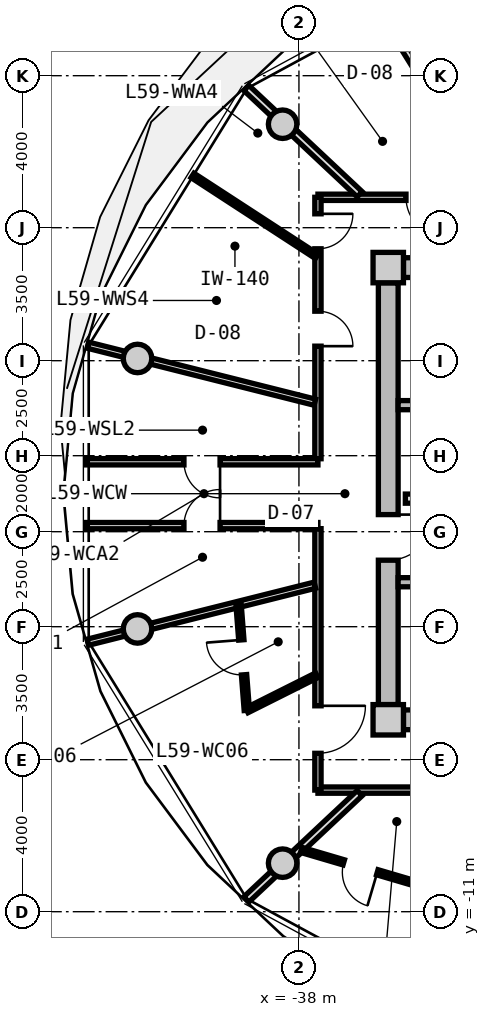
"""IFC4 building model, lengths in metres.
Left out: names, types, materials, properties, quantities, classifications, styles, units other than length and angle.
Written with IfcOpenShell. Run it as: python <this file> out.ifc"""

import sys

from ifc_helpers import new_model, si_unit, direction, frame, frame_2d, origin, origin_2d, place, context, subcontext, project, spatial, rectangle, circle, extrude, source, transform, mapped, element, fill, save


model = new_model("IFC4")
c1 = context("Model", 3, precision=1e-05, world=origin(), true_north=direction((0.0, 1.0)))
c2 = subcontext(c1, "Body", "Model", "MODEL_VIEW")
j1 = project(units=[si_unit("LENGTHUNIT", "METRE"), si_unit("PLANEANGLEUNIT", "RADIAN")], contexts=[c1])
p1 = place(None, origin())
s1 = spatial("IfcSite", under=j1, at=p1, CompositionType="ELEMENT")
p2 = place(p1, origin())
s2 = spatial("IfcBuilding", under=s1, at=p2, CompositionType="ELEMENT")
p3 = place(p2, frame((0.0, 0.0, 190.65)))
s3 = spatial("IfcBuildingStorey", under=s2, at=p3, CompositionType="ELEMENT", Elevation=190.65)
m1 = source(origin(), c2, "Body", "SweptSolid", [
    extrude(rectangle(XDim=0.8, YDim=0.8, at=origin_2d()), origin(), (0.0, 0.0, 1.0), 3.05),
])
for number, where, z_axis, x_axis in (
    (1, (-35.65, -5.95, 0.0), (0.0, 0.0, 1.0), (1.0, 0.0, 0.0)),
    (2, (-35.65, 5.95, 0.0), (0.0, 0.0, 1.0), (1.0, 0.0, 0.0)),
):
    element("IfcColumn", number, at=place(p3, frame(where, z_axis=z_axis, x_axis=x_axis)), inside=s3, PredefinedType="COLUMN", context=c2, shape_type="MappedRepresentation", body=[
        mapped(m1, transform((0.0, 0.0, 0.0), x_axis=(1.0, 0.0, 0.0), y_axis=(0.0, 1.0, 0.0), z_axis=(0.0, 0.0, 1.0), scale=1.0)),
    ])
m2 = source(origin(), c2, "Body", "SweptSolid", [
    extrude(rectangle(XDim=14.5, YDim=0.52, at=frame_2d((7.25, 0.0))), origin(), (0.0, 0.0, 1.0), 2.81),
])
for number, where, z_axis, x_axis in (
    (3, (-35.25, 5.95, 0.0), (0.0, 0.0, 1.0), (1.0, 0.0, 0.0)),
    (4, (-20.75, -5.95, 0.0), (0.0, 0.0, 1.0), (-1.0, 0.0, 0.0)),
):
    element("IfcWall", number, at=place(p3, frame(where, z_axis=z_axis, x_axis=x_axis)), inside=s3, PredefinedType="SHEAR", context=c2, shape_type="MappedRepresentation", body=[
        mapped(m2, transform((0.0, 0.0, 0.0), x_axis=(1.0, 0.0, 0.0), y_axis=(0.0, 1.0, 0.0), z_axis=(0.0, 0.0, 1.0), scale=1.0)),
    ])
m3 = source(origin(), c2, "Body", "SweptSolid", [
    extrude(rectangle(XDim=11.1, YDim=0.52, at=frame_2d((5.55, 0.0))), origin(), (0.0, 0.0, 1.0), 2.81),
])
p4 = place(p3, frame((-35.65, -5.55, 0.0), z_axis=(0.0, 0.0, 1.0), x_axis=(0.0, 1.0, 0.0)))
e5 = element("IfcWall", 5, at=p4, inside=s3, PredefinedType="SHEAR", context=c2, shape_type="MappedRepresentation", body=[
    mapped(m3, transform((0.0, 0.0, 0.0), x_axis=(1.0, 0.0, 0.0), y_axis=(0.0, 1.0, 0.0), z_axis=(0.0, 0.0, 1.0), scale=1.0)),
])
p5 = place(p4, frame((3.8, 0.0, 0.0)))
e6 = element("IfcOpeningElement", 6, at=p5, cuts=e5, PredefinedType="OPENING", context=c2, shape_type="SweptSolid", body=[
    extrude(rectangle(XDim=1.2, YDim=2.15, at=frame_2d((0.6, 1.075))), frame((0.0, 0.27, 0.0), z_axis=(0.0, -1.0, 0.0), x_axis=(1.0, 0.0, 0.0)), (0.0, 0.0, 1.0), 0.54),
])
m4 = source(origin(), c2, "Body", "SweptSolid", [
    extrude(circle(Radius=0.375, at=origin_2d()), origin(), (0.0, 0.0, 1.0), 3.47),
])
for number, where, z_axis, x_axis in (
    (7, (-38.43, 9.723, -0.42), (0.0, 0.0, 1.0), (1.0, 0.0, 0.0)),
    (8, (-42.247, 3.559, -0.42), (0.0, 0.0, 1.0), (1.0, 0.0, 0.0)),
    (9, (-42.247, -3.559, -0.42), (0.0, 0.0, 1.0), (1.0, 0.0, 0.0)),
    (10, (-38.43, -9.723, -0.42), (0.0, 0.0, 1.0), (1.0, 0.0, 0.0)),
):
    element("IfcColumn", number, at=place(p3, frame(where, z_axis=z_axis, x_axis=x_axis)), inside=s3, PredefinedType="COLUMN", context=c2, shape_type="MappedRepresentation", body=[
        mapped(m4, transform((0.0, 0.0, 0.0), x_axis=(1.0, 0.0, 0.0), y_axis=(0.0, 1.0, 0.0), z_axis=(0.0, 0.0, 1.0), scale=1.0)),
    ])
m5 = source(origin(), c2, "Body", "SweptSolid", [
    extrude(rectangle(XDim=7.93, YDim=0.24, at=frame_2d((3.965, 0.0))), origin(), (0.0, 0.0, 1.0), 2.81),
])
p6 = place(p3, frame((-35.39, 2.33, 0.0), z_axis=(0.0, 0.0, 1.0), x_axis=(1.0, 0.0, 0.0)))
e11 = element("IfcWall", 11, at=p6, inside=s3, PredefinedType="PARTITIONING", context=c2, shape_type="MappedRepresentation", body=[
    mapped(m5, transform((0.0, 0.0, 0.0), x_axis=(1.0, 0.0, 0.0), y_axis=(0.0, 1.0, 0.0), z_axis=(0.0, 0.0, 1.0), scale=1.0)),
])
p7 = place(p3, frame((-35.39, -2.33, 0.0), z_axis=(0.0, 0.0, 1.0), x_axis=(1.0, 0.0, 0.0)))
e12 = element("IfcWall", 12, at=p7, inside=s3, PredefinedType="PARTITIONING", context=c2, shape_type="MappedRepresentation", body=[
    mapped(m5, transform((0.0, 0.0, 0.0), x_axis=(1.0, 0.0, 0.0), y_axis=(0.0, 1.0, 0.0), z_axis=(0.0, 0.0, 1.0), scale=1.0)),
])
p8 = place(p7, frame((1.05, 0.0, 0.0)))
e13 = element("IfcOpeningElement", 13, at=p8, cuts=e12, PredefinedType="OPENING", context=c2, shape_type="SweptSolid", body=[
    extrude(rectangle(XDim=1.1, YDim=2.15, at=frame_2d((0.55, 1.075))), frame((0.0, 0.13, 0.0), z_axis=(0.0, -1.0, 0.0), x_axis=(1.0, 0.0, 0.0)), (0.0, 0.0, 1.0), 0.26),
])
m6 = source(origin(), c2, "Body", "SweptSolid", [
    extrude(rectangle(XDim=7.62, YDim=0.24, at=frame_2d((3.81, 0.0))), origin(), (0.0, 0.0, 1.0), 2.795),
])
p9 = place(p3, frame((-35.2, -0.13, 0.0), z_axis=(0.0, 0.0, 1.0), x_axis=(1.0, 0.0, 0.0)))
e14 = element("IfcWall", 14, at=p9, inside=s3, PredefinedType="PARTITIONING", context=c2, shape_type="MappedRepresentation", body=[
    mapped(m6, transform((0.0, 0.0, 0.0), x_axis=(1.0, 0.0, 0.0), y_axis=(0.0, 1.0, 0.0), z_axis=(0.0, 0.0, 1.0), scale=1.0)),
])
p10 = place(p9, frame((6.22, 0.0, 0.0)))
e15 = element("IfcOpeningElement", 15, at=p10, cuts=e14, PredefinedType="OPENING", context=c2, shape_type="SweptSolid", body=[
    extrude(rectangle(XDim=1.0, YDim=2.1, at=frame_2d((0.5, 1.05))), frame((0.0, 0.13, 0.0), z_axis=(0.0, -1.0, 0.0), x_axis=(1.0, 0.0, 0.0)), (0.0, 0.0, 1.0), 0.26),
])
p11 = place(p9, frame((2.4, 0.0, 0.0)))
e16 = element("IfcOpeningElement", 16, at=p11, cuts=e14, PredefinedType="OPENING", context=c2, shape_type="SweptSolid", body=[
    extrude(rectangle(XDim=1.0, YDim=2.1, at=frame_2d((0.5, 1.05))), frame((0.0, 0.13, 0.0), z_axis=(0.0, -1.0, 0.0), x_axis=(1.0, 0.0, 0.0)), (0.0, 0.0, 1.0), 0.26),
])
m7 = source(origin(), c2, "Body", "SweptSolid", [
    extrude(rectangle(XDim=8.58, YDim=0.165, at=frame_2d((4.29, 0.0))), origin(), (0.0, 0.0, 1.0), 2.795),
])
p12 = place(p3, frame((-37.5, 7.8, 0.0), z_axis=(0.0, 0.0, 1.0), x_axis=(1.0, 0.0, 0.0)))
e17 = element("IfcWall", 17, at=p12, inside=s3, PredefinedType="PARTITIONING", context=c2, shape_type="MappedRepresentation", body=[
    mapped(m7, transform((0.0, 0.0, 0.0), x_axis=(1.0, 0.0, 0.0), y_axis=(0.0, 1.0, 0.0), z_axis=(0.0, 0.0, 1.0), scale=1.0)),
])
p13 = place(p12, frame((5.408, 0.0, 0.0)))
e18 = element("IfcOpeningElement", 18, at=p13, cuts=e17, PredefinedType="OPENING", context=c2, shape_type="SweptSolid", body=[
    extrude(rectangle(XDim=1.05, YDim=2.15, at=frame_2d((0.525, 1.075))), frame((0.0, 0.093, 0.0), z_axis=(0.0, -1.0, 0.0), x_axis=(1.0, 0.0, 0.0)), (0.0, 0.0, 1.0), 0.185),
])
p14 = place(p12, frame((2.317, 0.0, 0.0)))
e19 = element("IfcOpeningElement", 19, at=p14, cuts=e17, PredefinedType="OPENING", context=c2, shape_type="SweptSolid", body=[
    extrude(rectangle(XDim=1.05, YDim=2.15, at=frame_2d((0.525, 1.075))), frame((0.0, 0.093, 0.0), z_axis=(0.0, -1.0, 0.0), x_axis=(1.0, 0.0, 0.0)), (0.0, 0.0, 1.0), 0.185),
])
m8 = source(origin(), c2, "Body", "SweptSolid", [
    extrude(rectangle(XDim=19.0, YDim=0.165, at=frame_2d((9.5, 0.0))), origin(), (0.0, 0.0, 1.0), 2.795),
])
p15 = place(p3, frame((-18.5, -7.8, 0.0), z_axis=(0.0, 0.0, 1.0), x_axis=(-1.0, 0.0, 0.0)))
e20 = element("IfcWall", 20, at=p15, inside=s3, PredefinedType="PARTITIONING", context=c2, shape_type="MappedRepresentation", body=[
    mapped(m8, transform((0.0, 0.0, 0.0), x_axis=(1.0, 0.0, 0.0), y_axis=(0.0, 1.0, 0.0), z_axis=(0.0, 0.0, 1.0), scale=1.0)),
])
p16 = place(p15, frame((12.569, 0.0, 0.0)))
e21 = element("IfcOpeningElement", 21, at=p16, cuts=e20, PredefinedType="OPENING", context=c2, shape_type="SweptSolid", body=[
    extrude(rectangle(XDim=1.25, YDim=2.2, at=frame_2d((0.625, 1.1))), frame((0.0, 0.093, 0.0), z_axis=(0.0, -1.0, 0.0), x_axis=(1.0, 0.0, 0.0)), (0.0, 0.0, 1.0), 0.185),
])
p17 = place(p15, frame((7.868, 0.0, 0.0)))
e22 = element("IfcOpeningElement", 22, at=p17, cuts=e20, PredefinedType="OPENING", context=c2, shape_type="SweptSolid", body=[
    extrude(rectangle(XDim=1.25, YDim=2.2, at=frame_2d((0.625, 1.1))), frame((0.0, 0.093, 0.0), z_axis=(0.0, -1.0, 0.0), x_axis=(1.0, 0.0, 0.0)), (0.0, 0.0, 1.0), 0.185),
])
p18 = place(p15, frame((3.559, 0.0, 0.0)))
e23 = element("IfcOpeningElement", 23, at=p18, cuts=e20, PredefinedType="OPENING", context=c2, shape_type="SweptSolid", body=[
    extrude(rectangle(XDim=1.25, YDim=2.2, at=frame_2d((0.625, 1.1))), frame((0.0, 0.093, 0.0), z_axis=(0.0, -1.0, 0.0), x_axis=(1.0, 0.0, 0.0)), (0.0, 0.0, 1.0), 0.185),
])
m9 = source(origin(), c2, "Body", "SweptSolid", [
    extrude(rectangle(XDim=6.88, YDim=0.165, at=frame_2d((3.44, 0.0))), origin(), (0.0, 0.0, 1.0), 2.795),
])
p19 = place(p3, frame((-37.5, -7.8, 0.0), z_axis=(0.0, 0.0, 1.0), x_axis=(0.0, 1.0, 0.0)))
e24 = element("IfcWall", 24, at=p19, inside=s3, PredefinedType="PARTITIONING", context=c2, shape_type="MappedRepresentation", body=[
    mapped(m9, transform((0.0, 0.0, 0.0), x_axis=(1.0, 0.0, 0.0), y_axis=(0.0, 1.0, 0.0), z_axis=(0.0, 0.0, 1.0), scale=1.0)),
])
p20 = place(p19, frame((0.968, 0.0, 0.0)))
e25 = element("IfcOpeningElement", 25, at=p20, cuts=e24, PredefinedType="OPENING", context=c2, shape_type="SweptSolid", body=[
    extrude(rectangle(XDim=1.25, YDim=2.2, at=frame_2d((0.625, 1.1))), frame((0.0, 0.093, 0.0), z_axis=(0.0, -1.0, 0.0), x_axis=(1.0, 0.0, 0.0)), (0.0, 0.0, 1.0), 0.185),
])
p21 = place(p3, frame((-37.5, 0.92, 0.0), z_axis=(0.0, 0.0, 1.0), x_axis=(0.0, 1.0, 0.0)))
e26 = element("IfcWall", 26, at=p21, inside=s3, PredefinedType="PARTITIONING", context=c2, shape_type="MappedRepresentation", body=[
    mapped(m9, transform((0.0, 0.0, 0.0), x_axis=(1.0, 0.0, 0.0), y_axis=(0.0, 1.0, 0.0), z_axis=(0.0, 0.0, 1.0), scale=1.0)),
])
p22 = place(p21, frame((5.525, 0.0, 0.0)))
e27 = element("IfcOpeningElement", 27, at=p22, cuts=e26, PredefinedType="OPENING", context=c2, shape_type="SweptSolid", body=[
    extrude(rectangle(XDim=0.92, YDim=2.1, at=frame_2d((0.46, 1.05))), frame((0.0, 0.093, 0.0), z_axis=(0.0, -1.0, 0.0), x_axis=(1.0, 0.0, 0.0)), (0.0, 0.0, 1.0), 0.185),
])
p23 = place(p21, frame((2.962, 0.0, 0.0)))
e28 = element("IfcOpeningElement", 28, at=p23, cuts=e26, PredefinedType="OPENING", context=c2, shape_type="SweptSolid", body=[
    extrude(rectangle(XDim=0.92, YDim=2.1, at=frame_2d((0.46, 1.05))), frame((0.0, 0.093, 0.0), z_axis=(0.0, -1.0, 0.0), x_axis=(1.0, 0.0, 0.0)), (0.0, 0.0, 1.0), 0.185),
])
m10 = source(origin(), c2, "Body", "SweptSolid", [
    extrude(rectangle(XDim=6.157, YDim=0.165, at=frame_2d((3.079, 0.0))), origin(), (0.0, 0.0, 1.0), 2.395),
])
for number, where, z_axis, x_axis in (
    (29, (-37.58, 2.407, 0.0), (0.0, 0.0, 1.0), (-0.97, 0.244, 0.0)),
    (30, (-37.58, -2.407, 0.0), (0.0, 0.0, 1.0), (-0.97, -0.244, 0.0)),
):
    element("IfcWall", number, at=place(p3, frame(where, z_axis=z_axis, x_axis=x_axis)), inside=s3, PredefinedType="PARTITIONING", context=c2, shape_type="MappedRepresentation", body=[
        mapped(m10, transform((0.0, 0.0, 0.0), x_axis=(1.0, 0.0, 0.0), y_axis=(0.0, 1.0, 0.0), z_axis=(0.0, 0.0, 1.0), scale=1.0)),
    ])
m11 = source(origin(), c2, "Body", "SweptSolid", [
    extrude(rectangle(XDim=6.101, YDim=0.165, at=frame_2d((3.051, 0.0))), origin(), (0.0, 0.0, 1.0), 2.795),
])
p24 = place(p3, frame((-43.601, 0.84, 0.0), z_axis=(0.0, 0.0, 1.0), x_axis=(1.0, 0.0, 0.0)))
e31 = element("IfcWall", 31, at=p24, inside=s3, PredefinedType="PARTITIONING", context=c2, shape_type="MappedRepresentation", body=[
    mapped(m11, transform((0.0, 0.0, 0.0), x_axis=(1.0, 0.0, 0.0), y_axis=(0.0, 1.0, 0.0), z_axis=(0.0, 0.0, 1.0), scale=1.0)),
])
p25 = place(p24, frame((2.576, 0.0, 0.0)))
e32 = element("IfcOpeningElement", 32, at=p25, cuts=e31, PredefinedType="OPENING", context=c2, shape_type="SweptSolid", body=[
    extrude(rectangle(XDim=0.95, YDim=2.1, at=frame_2d((0.475, 1.05))), frame((0.0, 0.093, 0.0), z_axis=(0.0, -1.0, 0.0), x_axis=(1.0, 0.0, 0.0)), (0.0, 0.0, 1.0), 0.185),
])
p26 = place(p3, frame((-37.5, -0.84, 0.0), z_axis=(0.0, 0.0, 1.0), x_axis=(-1.0, 0.0, 0.0)))
e33 = element("IfcWall", 33, at=p26, inside=s3, PredefinedType="PARTITIONING", context=c2, shape_type="MappedRepresentation", body=[
    mapped(m11, transform((0.0, 0.0, 0.0), x_axis=(1.0, 0.0, 0.0), y_axis=(0.0, 1.0, 0.0), z_axis=(0.0, 0.0, 1.0), scale=1.0)),
])
p27 = place(p26, frame((2.576, 0.0, 0.0)))
e34 = element("IfcOpeningElement", 34, at=p27, cuts=e33, PredefinedType="OPENING", context=c2, shape_type="SweptSolid", body=[
    extrude(rectangle(XDim=0.95, YDim=2.1, at=frame_2d((0.475, 1.05))), frame((0.0, 0.093, 0.0), z_axis=(0.0, -1.0, 0.0), x_axis=(1.0, 0.0, 0.0)), (0.0, 0.0, 1.0), 0.185),
])
m12 = source(origin(), c2, "Body", "SweptSolid", [
    extrude(rectangle(XDim=4.089, YDim=0.19, at=frame_2d((2.044, 0.0))), origin(), (0.0, 0.0, 1.0), 2.395),
])
p28 = place(p3, frame((-36.402, 7.88, 0.0), z_axis=(0.0, 0.0, 1.0), x_axis=(-0.729401273609, 0.684086092577, 0.0)))
e35 = element("IfcWall", 35, at=p28, inside=s3, PredefinedType="PARTITIONING", context=c2, shape_type="MappedRepresentation", body=[
    mapped(m12, transform((0.0, 0.0, 0.0), x_axis=(1.0, 0.0, 0.0), y_axis=(0.0, 1.0, 0.0), z_axis=(0.0, 0.0, 1.0), scale=1.0)),
])
m13 = source(origin(), c2, "Body", "SweptSolid", [
    extrude(rectangle(XDim=5.652, YDim=0.19, at=frame_2d((2.826, 0.0))), origin(), (0.0, 0.0, 1.0), 2.795),
])
p29 = place(p3, frame((-32.794, 7.83, 0.0), z_axis=(0.0, 0.0, 1.0), x_axis=(-0.527566076956, 0.84951399897, 0.0)))
e36 = element("IfcWall", 36, at=p29, inside=s3, PredefinedType="PARTITIONING", context=c2, shape_type="MappedRepresentation", body=[
    mapped(m13, transform((0.0, 0.0, 0.0), x_axis=(1.0, 0.0, 0.0), y_axis=(0.0, 1.0, 0.0), z_axis=(0.0, 0.0, 1.0), scale=1.0)),
])
m14 = source(origin(), c2, "Body", "SweptSolid", [
    extrude(rectangle(XDim=3.904, YDim=0.14, at=frame_2d((1.952, 0.0))), origin(), (0.0, 0.0, 1.0), 2.795),
])
p30 = place(p3, frame((-37.53, 6.246, 0.0), z_axis=(0.0, 0.0, 1.0), x_axis=(-0.838024687996, 0.545632314209, 0.0)))
e37 = element("IfcWall", 37, at=p30, inside=s3, PredefinedType="PARTITIONING", context=c2, shape_type="MappedRepresentation", body=[
    mapped(m14, transform((0.0, 0.0, 0.0), x_axis=(1.0, 0.0, 0.0), y_axis=(0.0, 1.0, 0.0), z_axis=(0.0, 0.0, 1.0), scale=1.0)),
])
p31 = place(p3, frame((-36.402, -7.88, 0.0), z_axis=(0.0, 0.0, 1.0), x_axis=(-0.729401273609, -0.684086092577, 0.0)))
e38 = element("IfcWall", 38, at=p31, inside=s3, PredefinedType="PARTITIONING", context=c2, shape_type="MappedRepresentation", body=[
    mapped(m12, transform((0.0, 0.0, 0.0), x_axis=(1.0, 0.0, 0.0), y_axis=(0.0, 1.0, 0.0), z_axis=(0.0, 0.0, 1.0), scale=1.0)),
])
m15 = source(origin(), c2, "Body", "SweptSolid", [
    extrude(rectangle(XDim=2.06, YDim=0.14, at=frame_2d((1.03, 0.0))), origin(), (0.0, 0.0, 1.0), 2.795),
])
p32 = place(p3, frame((-37.53, -4.778, 0.0), z_axis=(0.0, 0.0, 1.0), x_axis=(-0.893952568722, -0.448161583444, 0.0)))
e39 = element("IfcWall", 39, at=p32, inside=s3, PredefinedType="PARTITIONING", context=c2, shape_type="MappedRepresentation", body=[
    mapped(m15, transform((0.0, 0.0, 0.0), x_axis=(1.0, 0.0, 0.0), y_axis=(0.0, 1.0, 0.0), z_axis=(0.0, 0.0, 1.0), scale=1.0)),
])
m16 = source(origin(), c2, "Body", "SweptSolid", [
    extrude(rectangle(XDim=2.798, YDim=0.14, at=frame_2d((1.399, 0.0))), origin(), (0.0, 0.0, 1.0), 2.795),
])
p33 = place(p3, frame((-39.371, -5.701, 0.0), z_axis=(0.0, 0.0, 1.0), x_axis=(-0.077823984089, 0.996967114553, 0.0)))
e40 = element("IfcWall", 40, at=p33, inside=s3, PredefinedType="PARTITIONING", context=c2, shape_type="MappedRepresentation", body=[
    mapped(m16, transform((0.0, 0.0, 0.0), x_axis=(1.0, 0.0, 0.0), y_axis=(0.0, 1.0, 0.0), z_axis=(0.0, 0.0, 1.0), scale=1.0)),
])
p34 = place(p33, frame((0.939, 0.0, 0.0)))
e41 = element("IfcOpeningElement", 41, at=p34, cuts=e40, PredefinedType="OPENING", context=c2, shape_type="SweptSolid", body=[
    extrude(rectangle(XDim=0.92, YDim=2.1, at=frame_2d((0.46, 1.05))), frame((0.0, 0.08, 0.0), z_axis=(0.0, -1.0, 0.0), x_axis=(1.0, 0.0, 0.0)), (0.0, 0.0, 1.0), 0.16),
])
m17 = source(origin(), c2, "Body", "SweptSolid", [
    extrude(rectangle(XDim=3.252, YDim=0.14, at=frame_2d((1.626, 0.0))), origin(), (0.0, 0.0, 1.0), 2.795),
])
p35 = place(p3, frame((-34.82, -10.291, 0.0), z_axis=(0.0, 0.0, 1.0), x_axis=(-0.959294945864, 0.282406102695, 0.0)))
e42 = element("IfcWall", 42, at=p35, inside=s3, PredefinedType="PARTITIONING", context=c2, shape_type="MappedRepresentation", body=[
    mapped(m17, transform((0.0, 0.0, 0.0), x_axis=(1.0, 0.0, 0.0), y_axis=(0.0, 1.0, 0.0), z_axis=(0.0, 0.0, 1.0), scale=1.0)),
])
p36 = place(p35, frame((1.166, 0.0, 0.0)))
e43 = element("IfcOpeningElement", 43, at=p36, cuts=e42, PredefinedType="OPENING", context=c2, shape_type="SweptSolid", body=[
    extrude(rectangle(XDim=0.92, YDim=2.1, at=frame_2d((0.46, 1.05))), frame((0.0, 0.08, 0.0), z_axis=(0.0, -1.0, 0.0), x_axis=(1.0, 0.0, 0.0)), (0.0, 0.0, 1.0), 0.16),
])
m18 = source(origin(), c2, "Body", "SweptSolid", [
    extrude(rectangle(XDim=1.2, YDim=2.15, at=frame_2d((0.6, 1.075))), frame((0.0, 0.025, 0.0), z_axis=(0.0, -1.0, 0.0), x_axis=(1.0, 0.0, 0.0)), (0.0, 0.0, 1.0), 0.05),
])
p37 = place(p5, frame((1.2, 0.0, 0.0), z_axis=(0.0, 0.0, 1.0), x_axis=(-1.0, 0.0, 0.0)))
e44 = element("IfcDoor", 44, at=p37, inside=s3, OperationType="SINGLE_SWING_LEFT", PredefinedType="DOOR", context=c2, shape_type="MappedRepresentation", body=[
    mapped(m18, transform((0.0, 0.0, 0.0), x_axis=(1.0, 0.0, 0.0), y_axis=(0.0, 1.0, 0.0), z_axis=(0.0, 0.0, 1.0), scale=1.0)),
])
fill(e6, e44)
m19 = source(origin(), c2, "Body", "SweptSolid", [
    extrude(rectangle(XDim=0.95, YDim=2.1, at=frame_2d((0.475, 1.05))), frame((0.0, 0.025, 0.0), z_axis=(0.0, -1.0, 0.0), x_axis=(1.0, 0.0, 0.0)), (0.0, 0.0, 1.0), 0.05),
])
p38 = place(p27, frame((0.95, 0.0, 0.0), z_axis=(0.0, 0.0, 1.0), x_axis=(-1.0, 0.0, 0.0)))
e45 = element("IfcDoor", 45, at=p38, inside=s3, OperationType="SINGLE_SWING_RIGHT", PredefinedType="DOOR", context=c2, shape_type="MappedRepresentation", body=[
    mapped(m19, transform((0.0, 0.0, 0.0), x_axis=(1.0, 0.0, 0.0), y_axis=(0.0, 1.0, 0.0), z_axis=(0.0, 0.0, 1.0), scale=1.0)),
])
fill(e34, e45)
p39 = place(p25, frame((0.95, 0.0, 0.0), z_axis=(0.0, 0.0, 1.0), x_axis=(-1.0, 0.0, 0.0)))
e46 = element("IfcDoor", 46, at=p39, inside=s3, OperationType="SINGLE_SWING_LEFT", PredefinedType="DOOR", context=c2, shape_type="MappedRepresentation", body=[
    mapped(m19, transform((0.0, 0.0, 0.0), x_axis=(1.0, 0.0, 0.0), y_axis=(0.0, 1.0, 0.0), z_axis=(0.0, 0.0, 1.0), scale=1.0)),
])
fill(e32, e46)
m20 = source(origin(), c2, "Body", "SweptSolid", [
    extrude(rectangle(XDim=1.05, YDim=2.15, at=frame_2d((0.525, 1.075))), frame((0.0, 0.025, 0.0), z_axis=(0.0, -1.0, 0.0), x_axis=(1.0, 0.0, 0.0)), (0.0, 0.0, 1.0), 0.05),
])
p40 = place(p14, frame((1.05, 0.0, 0.0), z_axis=(0.0, 0.0, 1.0), x_axis=(-1.0, 0.0, 0.0)))
e47 = element("IfcDoor", 47, at=p40, inside=s3, OperationType="SINGLE_SWING_LEFT", PredefinedType="DOOR", context=c2, shape_type="MappedRepresentation", body=[
    mapped(m20, transform((0.0, 0.0, 0.0), x_axis=(1.0, 0.0, 0.0), y_axis=(0.0, 1.0, 0.0), z_axis=(0.0, 0.0, 1.0), scale=1.0)),
])
fill(e19, e47)
m21 = source(origin(), c2, "Body", "SweptSolid", [
    extrude(rectangle(XDim=0.92, YDim=2.1, at=frame_2d((0.46, 1.05))), frame((0.0, 0.025, 0.0), z_axis=(0.0, -1.0, 0.0), x_axis=(1.0, 0.0, 0.0)), (0.0, 0.0, 1.0), 0.05),
])
p41 = place(p22, frame((0.92, 0.0, 0.0), z_axis=(0.0, 0.0, 1.0), x_axis=(-1.0, 0.0, 0.0)))
e48 = element("IfcDoor", 48, at=p41, inside=s3, OperationType="SINGLE_SWING_LEFT", PredefinedType="DOOR", context=c2, shape_type="MappedRepresentation", body=[
    mapped(m21, transform((0.0, 0.0, 0.0), x_axis=(1.0, 0.0, 0.0), y_axis=(0.0, 1.0, 0.0), z_axis=(0.0, 0.0, 1.0), scale=1.0)),
])
fill(e27, e48)
p42 = place(p23, frame((0.92, 0.0, 0.0), z_axis=(0.0, 0.0, 1.0), x_axis=(-1.0, 0.0, 0.0)))
e49 = element("IfcDoor", 49, at=p42, inside=s3, OperationType="SINGLE_SWING_RIGHT", PredefinedType="DOOR", context=c2, shape_type="MappedRepresentation", body=[
    mapped(m21, transform((0.0, 0.0, 0.0), x_axis=(1.0, 0.0, 0.0), y_axis=(0.0, 1.0, 0.0), z_axis=(0.0, 0.0, 1.0), scale=1.0)),
])
fill(e28, e49)
m22 = source(origin(), c2, "Body", "SweptSolid", [
    extrude(rectangle(XDim=1.25, YDim=2.2, at=frame_2d((0.625, 1.1))), frame((0.0, 0.025, 0.0), z_axis=(0.0, -1.0, 0.0), x_axis=(1.0, 0.0, 0.0)), (0.0, 0.0, 1.0), 0.05),
])
p43 = place(p20, frame((1.25, 0.0, 0.0), z_axis=(0.0, 0.0, 1.0), x_axis=(-1.0, 0.0, 0.0)))
e50 = element("IfcDoor", 50, at=p43, inside=s3, OperationType="SINGLE_SWING_LEFT", PredefinedType="DOOR", context=c2, shape_type="MappedRepresentation", body=[
    mapped(m22, transform((0.0, 0.0, 0.0), x_axis=(1.0, 0.0, 0.0), y_axis=(0.0, 1.0, 0.0), z_axis=(0.0, 0.0, 1.0), scale=1.0)),
])
fill(e25, e50)
p44 = place(p34, origin())
e51 = element("IfcDoor", 51, at=p44, inside=s3, OperationType="SINGLE_SWING_RIGHT", PredefinedType="DOOR", context=c2, shape_type="MappedRepresentation", body=[
    mapped(m21, transform((0.0, 0.0, 0.0), x_axis=(1.0, 0.0, 0.0), y_axis=(0.0, 1.0, 0.0), z_axis=(0.0, 0.0, 1.0), scale=1.0)),
])
fill(e41, e51)
p45 = place(p36, origin())
e52 = element("IfcDoor", 52, at=p45, inside=s3, OperationType="SINGLE_SWING_LEFT", PredefinedType="DOOR", context=c2, shape_type="MappedRepresentation", body=[
    mapped(m21, transform((0.0, 0.0, 0.0), x_axis=(1.0, 0.0, 0.0), y_axis=(0.0, 1.0, 0.0), z_axis=(0.0, 0.0, 1.0), scale=1.0)),
])
fill(e43, e52)
save(model, sys.argv[1])
